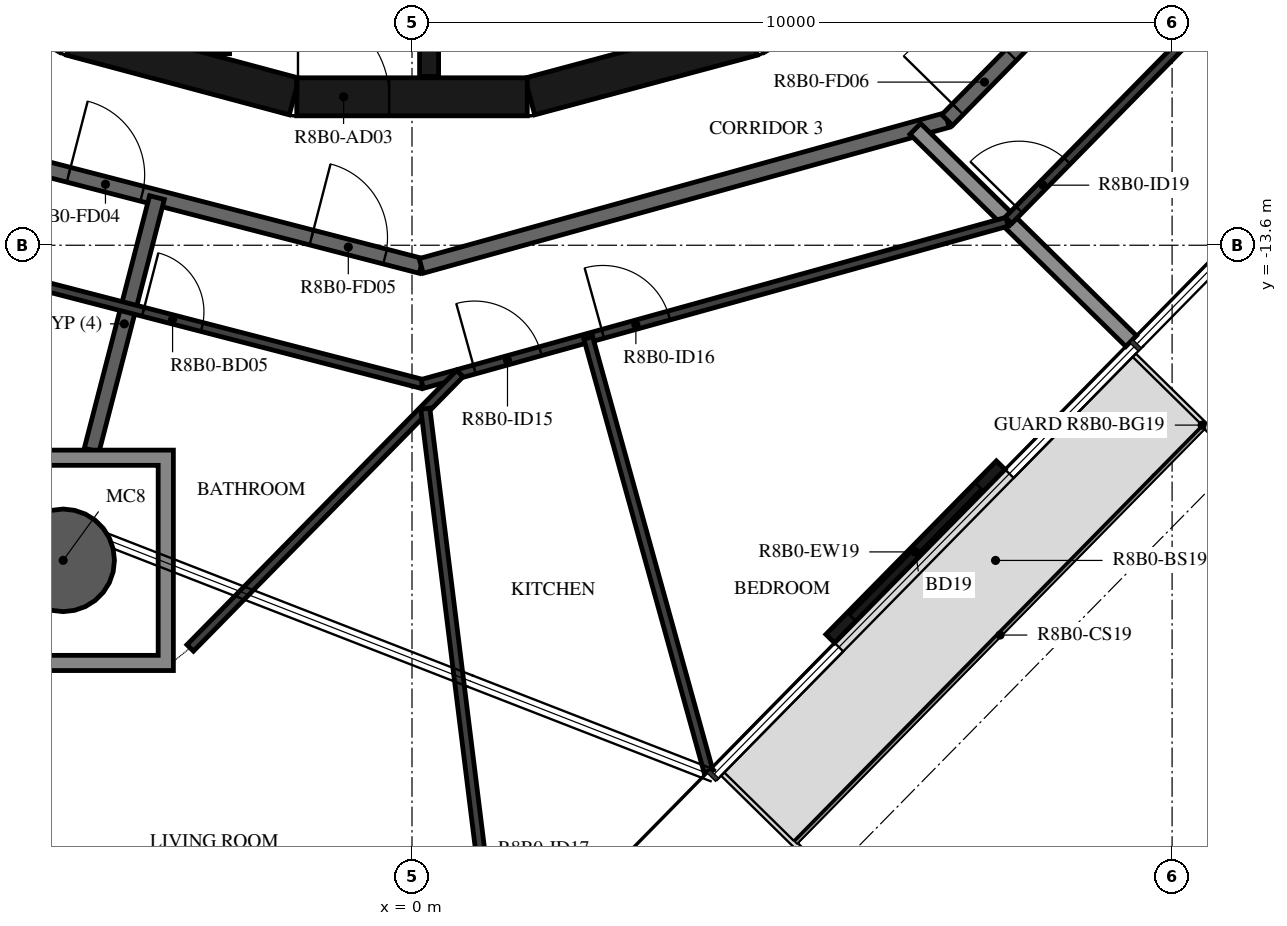
"""IFC4 building model, lengths in metres.
Left out: names, types, materials, properties, quantities, classifications, styles, units other than length and angle.
Written with IfcOpenShell. Run it as: python <this file> out.ifc"""

import sys

from ifc_helpers import new_model, si_unit, direction, frame, frame_2d, origin, origin_2d, place, context, subcontext, project, spatial, polyline, rectangle, hollow_circle, outline, extrude, element, fill, save


model = new_model("IFC4")
c1 = context("Model", 3, precision=1e-05, world=origin(), true_north=direction((0.0, 1.0)))
c2 = subcontext(c1, "Body", "Model", "MODEL_VIEW")
j1 = project(units=[si_unit("LENGTHUNIT", "METRE"), si_unit("PLANEANGLEUNIT", "RADIAN")], contexts=[c1])
p1 = place(None, origin())
s1 = spatial("IfcSite", under=j1, at=p1, CompositionType="ELEMENT")
p2 = place(p1, origin())
s2 = spatial("IfcBuilding", under=s1, at=p2, CompositionType="ELEMENT")
p3 = place(p2, frame((0.0, 0.0, 312.2)))
s3 = spatial("IfcBuildingStorey", under=s2, at=p3, CompositionType="ELEMENT", Elevation=312.2)
p4 = place(p3, frame((-4.589, -17.745, -0.38), z_axis=(0.0, 0.0, 1.0), x_axis=(1.0, 0.0, 0.0)))
e1 = element("IfcColumn", 1, at=p4, inside=s3, PredefinedType="COLUMN", context=c2, shape_type="SweptSolid", body=[
    extrude(hollow_circle(Radius=0.675, WallThickness=0.03, at=origin_2d()), origin(), (0.0, 0.0, 1.0), 3.5),
])
p5 = place(p3, frame((5.502, -18.776, 0.0), z_axis=(0.0, 0.0, 1.0), x_axis=(0.700900076932, 0.713259477439, 0.0)))
e2 = element("IfcWall", 2, at=p5, inside=s3, PredefinedType="STANDARD", context=c2, shape_type="SweptSolid", body=[
    extrude(rectangle(XDim=3.2, YDim=0.16, at=frame_2d((1.6, 0.0))), origin(), (0.0, 0.0, 1.0), 3.12),
])
p6 = place(p5, frame((0.4, 0.0, 0.0)))
e3 = element("IfcOpeningElement", 3, at=p6, cuts=e2, PredefinedType="OPENING", context=c2, shape_type="SweptSolid", body=[
    extrude(rectangle(XDim=2.4, YDim=2.4, at=frame_2d((1.2, 1.2))), frame((0.0, 0.09, 0.0), z_axis=(0.0, -1.0, 0.0), x_axis=(1.0, 0.0, 0.0)), (0.0, 0.0, 1.0), 0.18),
])
for number, where, z_axis, x_axis in (
    (4, (1.55, -11.643, 0.0), (0.0, 0.0, 1.0), (0.966, 0.259, 0.0)),
    (5, (-4.479, -10.858, 0.0), (0.0, 0.0, 1.0), (0.966, -0.259, 0.0)),
):
    element("IfcWall", number, at=place(p3, frame(where, z_axis=z_axis, x_axis=x_axis)), inside=s3, PredefinedType="SHEAR", context=c2, shape_type="SweptSolid", body=[
        extrude(rectangle(XDim=3.033, YDim=0.5, at=frame_2d((1.516, 0.0))), origin(), (0.0, 0.0, 1.0), 3.12),
    ])
p7 = place(p3, frame((-1.516, -11.647, 0.0), z_axis=(0.0, 0.0, 1.0), x_axis=(1.0, 0.0, 0.0)))
e6 = element("IfcWall", 6, at=p7, inside=s3, PredefinedType="SHEAR", context=c2, shape_type="SweptSolid", body=[
    extrude(rectangle(XDim=3.033, YDim=0.5, at=frame_2d((1.516, 0.0))), origin(), (0.0, 0.0, 1.0), 3.12),
])
p8 = place(p7, frame((0.016, 0.0, 0.0)))
e7 = element("IfcOpeningElement", 7, at=p8, cuts=e6, PredefinedType="OPENING", context=c2, shape_type="SweptSolid", body=[
    extrude(rectangle(XDim=1.2, YDim=2.1, at=frame_2d((0.6, 1.05))), frame((0.0, 0.26, 0.0), z_axis=(0.0, -1.0, 0.0), x_axis=(1.0, 0.0, 0.0)), (0.0, 0.0, 1.0), 0.52),
])
p9 = place(p3, frame((-2.525, -8.97, 0.0), z_axis=(0.0, 0.0, 1.0), x_axis=(0.0, -1.0, 0.0)))
e8 = element("IfcWall", 8, at=p9, inside=s3, PredefinedType="SHEAR", context=c2, shape_type="SweptSolid", body=[
    extrude(rectangle(XDim=2.11, YDim=0.25, at=frame_2d((1.055, 0.0))), origin(), (0.0, 0.0, 1.0), 3.12),
])
p10 = place(p3, frame((0.225, -8.97, 0.0), z_axis=(0.0, 0.0, 1.0), x_axis=(0.0, -1.0, 0.0)))
e9 = element("IfcWall", 9, at=p10, inside=s3, PredefinedType="SHEAR", context=c2, shape_type="SweptSolid", body=[
    extrude(rectangle(XDim=2.41, YDim=0.25, at=frame_2d((1.205, 0.0))), origin(), (0.0, 0.0, 1.0), 3.12),
])
p11 = place(p3, frame((-6.831, -12.074, 0.0), z_axis=(0.0, 0.0, 1.0), x_axis=(0.968144780225, -0.250391063186, 0.0)))
e10 = element("IfcWall", 10, at=p11, inside=s3, PredefinedType="STANDARD", context=c2, shape_type="SweptSolid", body=[
    extrude(rectangle(XDim=7.181, YDim=0.2, at=frame_2d((3.591, 0.0))), origin(), (0.0, 0.0, 1.0), 3.12),
])
p12 = place(p11, frame((2.39, 0.0, 0.0)))
e11 = element("IfcOpeningElement", 11, at=p12, cuts=e10, PredefinedType="OPENING", context=c2, shape_type="SweptSolid", body=[
    extrude(rectangle(XDim=1.0, YDim=2.1, at=frame_2d((0.5, 1.05))), frame((0.0, 0.11, 0.0), z_axis=(0.0, -1.0, 0.0), x_axis=(1.0, 0.0, 0.0)), (0.0, 0.0, 1.0), 0.22),
])
p13 = place(p11, frame((5.69, 0.0, 0.0)))
e12 = element("IfcOpeningElement", 12, at=p13, cuts=e10, PredefinedType="OPENING", context=c2, shape_type="SweptSolid", body=[
    extrude(rectangle(XDim=1.0, YDim=2.1, at=frame_2d((0.5, 1.05))), frame((0.0, 0.11, 0.0), z_axis=(0.0, -1.0, 0.0), x_axis=(1.0, 0.0, 0.0)), (0.0, 0.0, 1.0), 0.22),
])
p14 = place(p3, frame((0.121, -13.872, 0.0), z_axis=(0.0, 0.0, 1.0), x_axis=(0.963625960674, 0.267254575108, 0.0)))
e13 = element("IfcWall", 13, at=p14, inside=s3, PredefinedType="STANDARD", context=c2, shape_type="SweptSolid", body=[
    extrude(rectangle(XDim=7.181, YDim=0.2, at=frame_2d((3.591, 0.0))), origin(), (0.0, 0.0, 1.0), 3.12),
])
p15 = place(p3, frame((7.041, -11.953, 0.0), z_axis=(0.0, 0.0, 1.0), x_axis=(0.70090916255, 0.713250549143, 0.0)))
e14 = element("IfcWall", 14, at=p15, inside=s3, PredefinedType="STANDARD", context=c2, shape_type="SweptSolid", body=[
    extrude(rectangle(XDim=7.181, YDim=0.2, at=frame_2d((3.59, 0.0))), origin(), (0.0, 0.0, 1.0), 3.12),
])
p16 = place(p15, frame((0.2, 0.0, 0.0)))
e15 = element("IfcOpeningElement", 15, at=p16, cuts=e14, PredefinedType="OPENING", context=c2, shape_type="SweptSolid", body=[
    extrude(rectangle(XDim=1.0, YDim=2.1, at=frame_2d((0.5, 1.05))), frame((0.0, 0.11, 0.0), z_axis=(0.0, -1.0, 0.0), x_axis=(1.0, 0.0, 0.0)), (0.0, 0.0, 1.0), 0.22),
])
p17 = place(p3, frame((-4.214, -16.295, 0.0), z_axis=(0.0, 0.0, 1.0), x_axis=(0.250428810918, 0.968135016752, 0.0)))
e16 = element("IfcWall", 16, at=p17, inside=s3, PredefinedType="STANDARD", context=c2, shape_type="SweptSolid", body=[
    extrude(rectangle(XDim=3.432, YDim=0.2, at=frame_2d((1.716, 0.0))), origin(), (0.0, 0.0, 1.0), 3.12),
])
p18 = place(p3, frame((9.462, -14.861, 0.0), z_axis=(0.0, 0.0, 1.0), x_axis=(-0.713302018318, 0.700856783276, 0.0)))
e17 = element("IfcWall", 17, at=p18, inside=s3, PredefinedType="STANDARD", context=c2, shape_type="SweptSolid", body=[
    extrude(rectangle(XDim=3.982, YDim=0.2, at=frame_2d((1.991, 0.0))), origin(), (0.0, 0.0, 1.0), 2.73),
])
p19 = place(p3, frame((-6.788, -13.635, 0.0), z_axis=(0.0, 0.0, 1.0), x_axis=(0.968142345176, -0.250400478189, 0.0)))
e18 = element("IfcWall", 18, at=p19, inside=s3, PredefinedType="PARTITIONING", context=c2, shape_type="SweptSolid", body=[
    extrude(rectangle(XDim=7.151, YDim=0.12, at=frame_2d((3.575, 0.0))), origin(), (0.0, 0.0, 1.0), 3.12),
])
p20 = place(p19, frame((0.2, 0.0, 0.0)))
e19 = element("IfcOpeningElement", 19, at=p20, cuts=e18, PredefinedType="OPENING", context=c2, shape_type="SweptSolid", body=[
    extrude(rectangle(XDim=0.8, YDim=2.1, at=frame_2d((0.4, 1.05))), frame((0.0, 0.07, 0.0), z_axis=(0.0, -1.0, 0.0), x_axis=(1.0, 0.0, 0.0)), (0.0, 0.0, 1.0), 0.14),
])
p21 = place(p19, frame((3.358, 0.0, 0.0)))
e20 = element("IfcOpeningElement", 20, at=p21, cuts=e18, PredefinedType="OPENING", context=c2, shape_type="SweptSolid", body=[
    extrude(rectangle(XDim=0.8, YDim=2.1, at=frame_2d((0.4, 1.05))), frame((0.0, 0.07, 0.0), z_axis=(0.0, -1.0, 0.0), x_axis=(1.0, 0.0, 0.0)), (0.0, 0.0, 1.0), 0.14),
])
p22 = place(p3, frame((0.135, -15.425, 0.0), z_axis=(0.0, 0.0, 1.0), x_axis=(0.963633899075, 0.267225950373, 0.0)))
e21 = element("IfcWall", 21, at=p22, inside=s3, PredefinedType="PARTITIONING", context=c2, shape_type="SweptSolid", body=[
    extrude(rectangle(XDim=7.985, YDim=0.12, at=frame_2d((3.992, 0.0))), origin(), (0.0, 0.0, 1.0), 3.12),
])
p23 = place(p22, frame((0.714, 0.0, 0.0)))
e22 = element("IfcOpeningElement", 22, at=p23, cuts=e21, PredefinedType="OPENING", context=c2, shape_type="SweptSolid", body=[
    extrude(rectangle(XDim=0.9, YDim=2.1, at=frame_2d((0.45, 1.05))), frame((0.0, 0.07, 0.0), z_axis=(0.0, -1.0, 0.0), x_axis=(1.0, 0.0, 0.0)), (0.0, 0.0, 1.0), 0.14),
])
p24 = place(p22, frame((2.467, 0.0, 0.0)))
e23 = element("IfcOpeningElement", 23, at=p24, cuts=e21, PredefinedType="OPENING", context=c2, shape_type="SweptSolid", body=[
    extrude(rectangle(XDim=0.9, YDim=2.1, at=frame_2d((0.45, 1.05))), frame((0.0, 0.07, 0.0), z_axis=(0.0, -1.0, 0.0), x_axis=(1.0, 0.0, 0.0)), (0.0, 0.0, 1.0), 0.14),
])
p25 = place(p3, frame((-2.918, -18.898, 0.0), z_axis=(0.0, 0.0, 1.0), x_axis=(0.700881606707, 0.713277627141, 0.0)))
e24 = element("IfcWall", 24, at=p25, inside=s3, PredefinedType="PARTITIONING", context=c2, shape_type="SweptSolid", body=[
    extrude(rectangle(XDim=5.062, YDim=0.12, at=frame_2d((2.531, 0.0))), origin(), (0.0, 0.0, 1.0), 3.12),
])
p26 = place(p3, frame((1.119, -23.35, 0.0), z_axis=(0.0, 0.0, 1.0), x_axis=(-0.123281341476, 0.992371760402, 0.0)))
e25 = element("IfcWall", 25, at=p26, inside=s3, PredefinedType="PARTITIONING", context=c2, shape_type="SweptSolid", body=[
    extrude(rectangle(XDim=7.658, YDim=0.12, at=frame_2d((3.829, 0.0))), origin(), (0.0, 0.0, 1.0), 3.12),
])
p27 = place(p26, frame((0.6, 0.0, 0.0)))
e26 = element("IfcOpeningElement", 26, at=p27, cuts=e25, PredefinedType="OPENING", context=c2, shape_type="SweptSolid", body=[
    extrude(rectangle(XDim=0.9, YDim=2.1, at=frame_2d((0.45, 1.05))), frame((0.0, 0.07, 0.0), z_axis=(0.0, -1.0, 0.0), x_axis=(1.0, 0.0, 0.0)), (0.0, 0.0, 1.0), 0.14),
])
p28 = place(p3, frame((3.9, -20.521, 0.0), z_axis=(0.0, 0.0, 1.0), x_axis=(-0.267235205115, 0.963631332589, 0.0)))
e27 = element("IfcWall", 27, at=p28, inside=s3, PredefinedType="PARTITIONING", context=c2, shape_type="SweptSolid", body=[
    extrude(rectangle(XDim=5.916, YDim=0.12, at=frame_2d((2.958, 0.0))), origin(), (0.0, 0.0, 1.0), 3.12),
])
p29 = place(p3, frame((7.846, -13.273, 0.0), z_axis=(0.0, 0.0, 1.0), x_axis=(0.700915117659, 0.713244697027, 0.0)))
e28 = element("IfcWall", 28, at=p29, inside=s3, PredefinedType="PARTITIONING", context=c2, shape_type="SweptSolid", body=[
    extrude(rectangle(XDim=7.96, YDim=0.12, at=frame_2d((3.98, 0.0))), origin(), (0.0, 0.0, 1.0), 3.12),
])
p30 = place(p29, frame((0.2, 0.0, 0.0)))
e29 = element("IfcOpeningElement", 29, at=p30, cuts=e28, PredefinedType="OPENING", context=c2, shape_type="SweptSolid", body=[
    extrude(rectangle(XDim=0.9, YDim=2.1, at=frame_2d((0.45, 1.05))), frame((0.0, 0.07, 0.0), z_axis=(0.0, -1.0, 0.0), x_axis=(1.0, 0.0, 0.0)), (0.0, 0.0, 1.0), 0.14),
])
p31 = place(p3, origin())
e30 = element("IfcWall", 30, at=p31, inside=s3, PredefinedType="STANDARD", context=c2, shape_type="SweptSolid", body=[
    extrude(outline(polyline([(-3.139, -16.295), (-3.139, -19.195), (-6.039, -19.195), (-6.039, -16.295), (-3.139, -16.295)]), holes=[polyline([(-5.839, -18.995), (-3.339, -18.995), (-3.339, -16.495), (-5.839, -16.495), (-5.839, -18.995)])]), origin(), (0.0, 0.0, 1.0), 3.12),
])
p32 = place(p6, origin())
e31 = element("IfcDoor", 31, at=p32, inside=s3, OperationType="DOUBLE_DOOR_SLIDING", PredefinedType="DOOR", context=c2, shape_type="SweptSolid", body=[
    extrude(rectangle(XDim=2.4, YDim=2.4, at=frame_2d((1.2, 1.2))), frame((0.0, 0.025, 0.0), z_axis=(0.0, -1.0, 0.0), x_axis=(1.0, 0.0, 0.0)), (0.0, 0.0, 1.0), 0.05),
])
fill(e3, e31)
p33 = place(p8, origin())
e32 = element("IfcDoor", 32, at=p33, inside=s3, OperationType="SINGLE_SWING_RIGHT", PredefinedType="DOOR", context=c2, shape_type="SweptSolid", body=[
    extrude(rectangle(XDim=1.2, YDim=2.1, at=frame_2d((0.6, 1.05))), frame((0.0, 0.025, 0.0), z_axis=(0.0, -1.0, 0.0), x_axis=(1.0, 0.0, 0.0)), (0.0, 0.0, 1.0), 0.05),
])
fill(e7, e32)
p34 = place(p12, origin())
e33 = element("IfcDoor", 33, at=p34, inside=s3, OperationType="SINGLE_SWING_RIGHT", PredefinedType="DOOR", context=c2, shape_type="SweptSolid", body=[
    extrude(rectangle(XDim=1.0, YDim=2.1, at=frame_2d((0.5, 1.05))), frame((0.0, 0.025, 0.0), z_axis=(0.0, -1.0, 0.0), x_axis=(1.0, 0.0, 0.0)), (0.0, 0.0, 1.0), 0.05),
])
fill(e11, e33)
p35 = place(p13, origin())
e34 = element("IfcDoor", 34, at=p35, inside=s3, OperationType="SINGLE_SWING_LEFT", PredefinedType="DOOR", context=c2, shape_type="SweptSolid", body=[
    extrude(rectangle(XDim=1.0, YDim=2.1, at=frame_2d((0.5, 1.05))), frame((0.0, 0.025, 0.0), z_axis=(0.0, -1.0, 0.0), x_axis=(1.0, 0.0, 0.0)), (0.0, 0.0, 1.0), 0.05),
])
fill(e12, e34)
p36 = place(p21, origin())
e35 = element("IfcDoor", 35, at=p36, inside=s3, OperationType="SINGLE_SWING_RIGHT", PredefinedType="DOOR", context=c2, shape_type="SweptSolid", body=[
    extrude(rectangle(XDim=0.8, YDim=2.1, at=frame_2d((0.4, 1.05))), frame((0.0, 0.025, 0.0), z_axis=(0.0, -1.0, 0.0), x_axis=(1.0, 0.0, 0.0)), (0.0, 0.0, 1.0), 0.05),
])
fill(e20, e35)
p37 = place(p23, origin())
e36 = element("IfcDoor", 36, at=p37, inside=s3, OperationType="SINGLE_SWING_LEFT", PredefinedType="DOOR", context=c2, shape_type="SweptSolid", body=[
    extrude(rectangle(XDim=0.9, YDim=2.1, at=frame_2d((0.45, 1.05))), frame((0.0, 0.025, 0.0), z_axis=(0.0, -1.0, 0.0), x_axis=(1.0, 0.0, 0.0)), (0.0, 0.0, 1.0), 0.05),
])
fill(e22, e36)
p38 = place(p24, origin())
e37 = element("IfcDoor", 37, at=p38, inside=s3, OperationType="SINGLE_SWING_LEFT", PredefinedType="DOOR", context=c2, shape_type="SweptSolid", body=[
    extrude(rectangle(XDim=0.9, YDim=2.1, at=frame_2d((0.45, 1.05))), frame((0.0, 0.025, 0.0), z_axis=(0.0, -1.0, 0.0), x_axis=(1.0, 0.0, 0.0)), (0.0, 0.0, 1.0), 0.05),
])
fill(e23, e37)
p39 = place(p16, origin())
e38 = element("IfcDoor", 38, at=p39, inside=s3, OperationType="SINGLE_SWING_LEFT", PredefinedType="DOOR", context=c2, shape_type="SweptSolid", body=[
    extrude(rectangle(XDim=1.0, YDim=2.1, at=frame_2d((0.5, 1.05))), frame((0.0, 0.025, 0.0), z_axis=(0.0, -1.0, 0.0), x_axis=(1.0, 0.0, 0.0)), (0.0, 0.0, 1.0), 0.05),
])
fill(e15, e38)
p40 = place(p30, origin())
e39 = element("IfcDoor", 39, at=p40, inside=s3, OperationType="SINGLE_SWING_LEFT", PredefinedType="DOOR", context=c2, shape_type="SweptSolid", body=[
    extrude(rectangle(XDim=0.9, YDim=2.1, at=frame_2d((0.45, 1.05))), frame((0.0, 0.025, 0.0), z_axis=(0.0, -1.0, 0.0), x_axis=(1.0, 0.0, 0.0)), (0.0, 0.0, 1.0), 0.05),
])
fill(e29, e39)
save(model, sys.argv[1])
